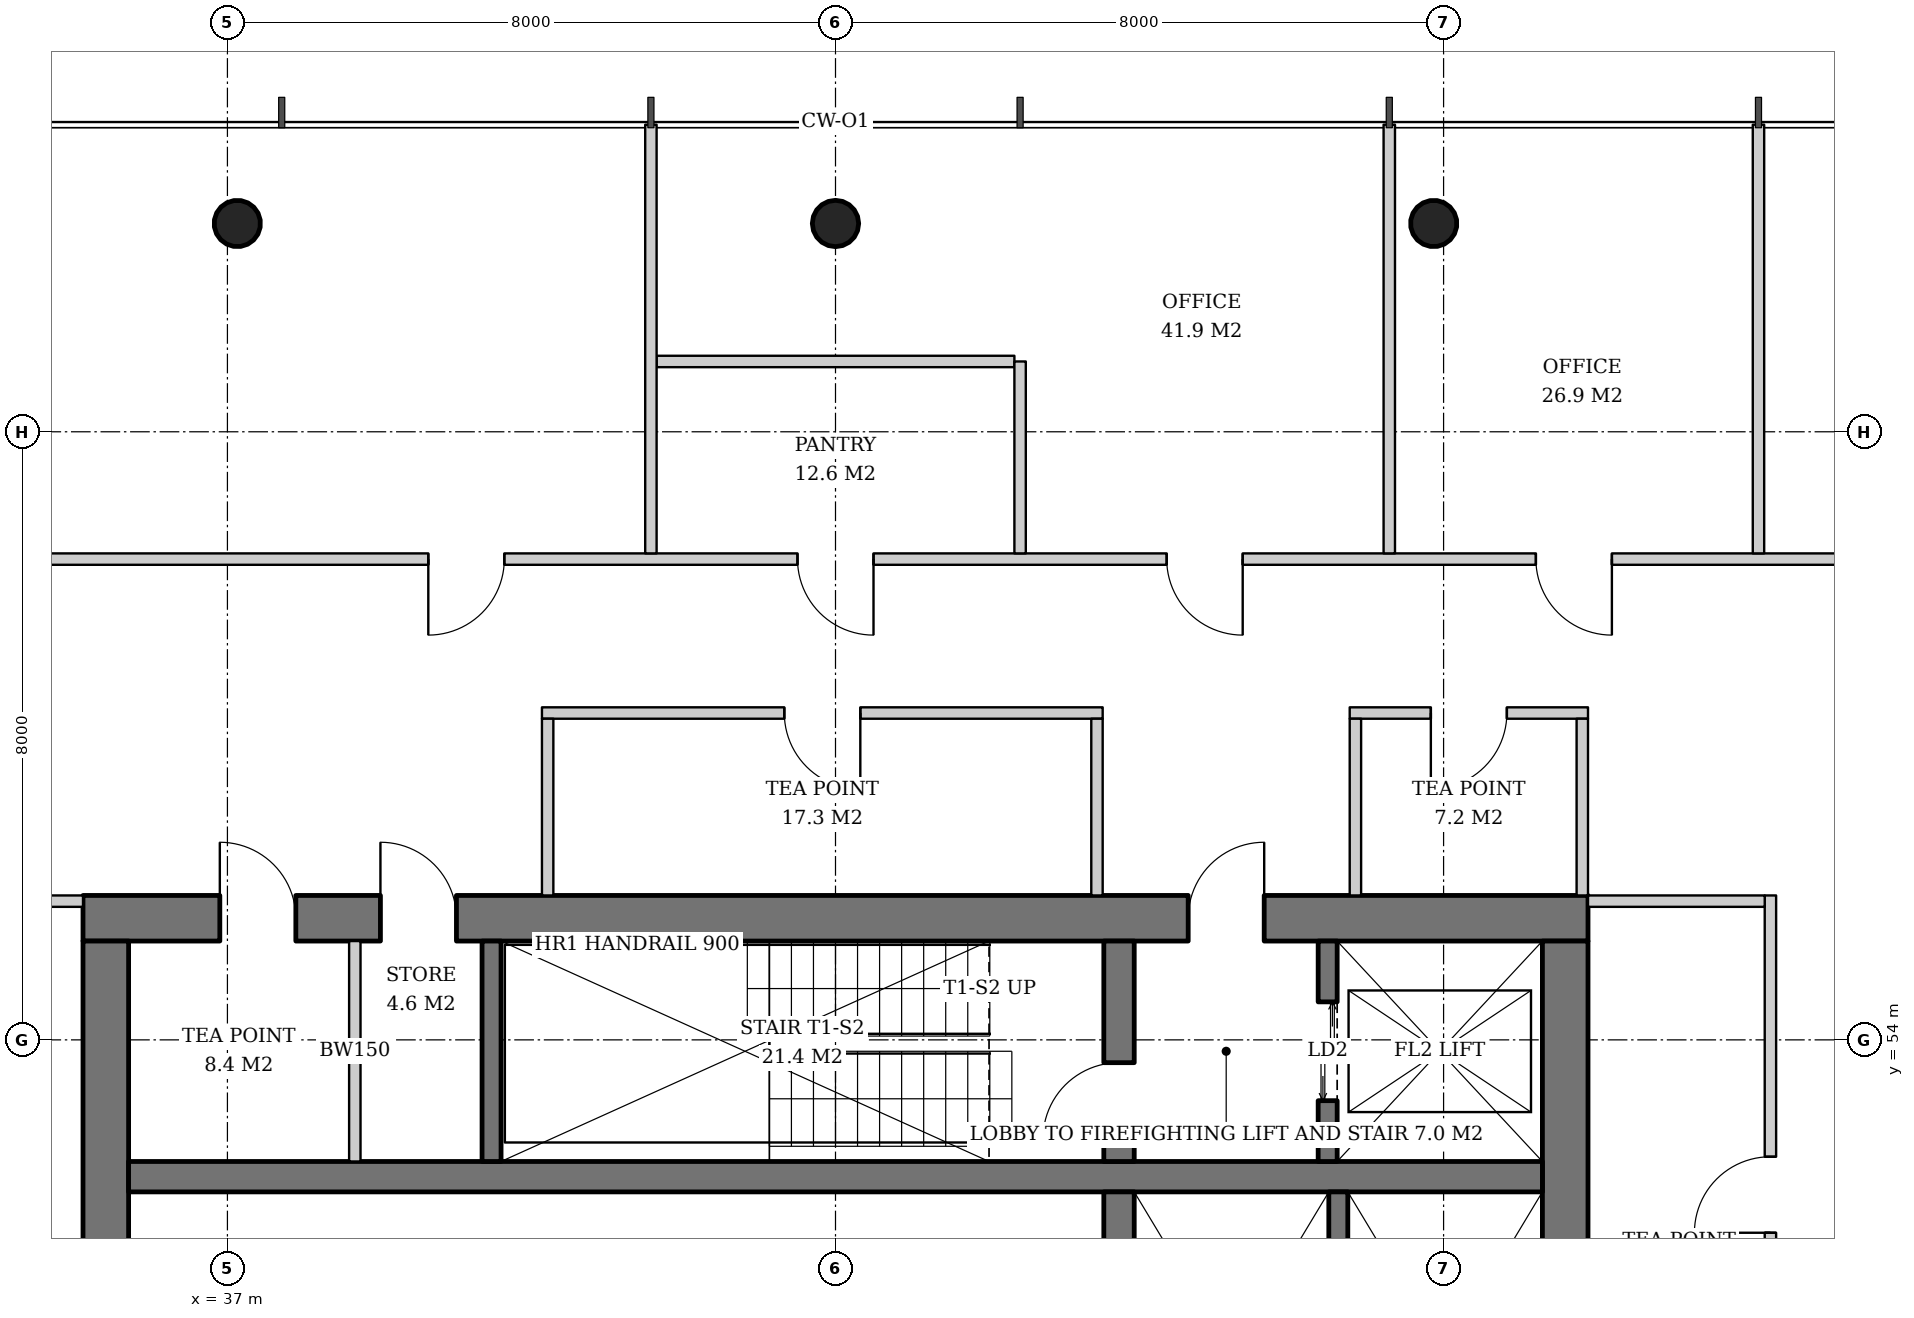
"""IFC4 building model, lengths in metres.
Left out: names, types, materials, properties, quantities, classifications, styles, units other than length and angle.
Written with IfcOpenShell. Run it as: python <this file> out.ifc"""

import sys

from ifc_helpers import new_model, si_unit, direction, frame, frame_2d, origin, origin_2d, place, context, subcontext, project, spatial, rectangle, hollow_circle, extrude, element, fill, save


model = new_model("IFC4")
c1 = context("Model", 3, precision=1e-05, world=origin(), true_north=direction((0.0, 1.0)))
c2 = subcontext(c1, "Body", "Model", "MODEL_VIEW")
j1 = project(units=[si_unit("LENGTHUNIT", "METRE"), si_unit("PLANEANGLEUNIT", "RADIAN")], contexts=[c1])
p1 = place(None, origin())
s1 = spatial("IfcSite", under=j1, at=p1, CompositionType="ELEMENT")
p2 = place(p1, origin())
s2 = spatial("IfcBuilding", under=s1, at=p2, CompositionType="ELEMENT")
p3 = place(p2, frame((0.0, 0.0, 184.4)))
s3 = spatial("IfcBuildingStorey", under=s2, at=p3, CompositionType="ELEMENT", Elevation=184.4)
p4 = place(p3, frame((52.889, 64.779, 0.0), z_axis=(-0.015987237665, -0.031910269556, 0.999362868496), x_axis=(0.894067115991, -0.447933021895, 0.0)))
e1 = element("IfcColumn", 1, at=p4, inside=s3, PredefinedType="COLUMN", context=c2, shape_type="SweptSolid", body=[
    extrude(hollow_circle(Radius=0.305, WallThickness=0.025, at=origin_2d()), origin(), (0.0, 0.0, 1.0), 3.802),
])
p5 = place(p3, frame((45.0, 64.779, 0.0), z_axis=(0.0, -0.031914348339, 0.999490607445), x_axis=(1.0, 0.0, 0.0)))
e2 = element("IfcColumn", 2, at=p5, inside=s3, PredefinedType="COLUMN", context=c2, shape_type="SweptSolid", body=[
    extrude(hollow_circle(Radius=0.305, WallThickness=0.025, at=origin_2d()), origin(), (0.0, 0.0, 1.0), 3.802),
])
p6 = place(p3, frame((37.111, 64.779, 0.0), z_axis=(0.015987237665, -0.031910269556, 0.999362868496), x_axis=(0.894067115991, 0.447933021895, 0.0)))
e3 = element("IfcColumn", 3, at=p6, inside=s3, PredefinedType="COLUMN", context=c2, shape_type="SweptSolid", body=[
    extrude(hollow_circle(Radius=0.305, WallThickness=0.025, at=origin_2d()), origin(), (0.0, 0.0, 1.0), 3.802),
])
p7 = place(p3, frame((35.1, 55.6, 0.0), z_axis=(0.0, 0.0, 1.0), x_axis=(1.0, 0.0, 0.0)))
e4 = element("IfcWall", 4, at=p7, inside=s3, PredefinedType="SHEAR", context=c2, shape_type="SweptSolid", body=[
    extrude(rectangle(XDim=19.8, YDim=0.6, at=frame_2d((9.9, 0.0))), origin(), (0.0, 0.0, 1.0), 3.8),
])
p8 = place(p7, frame((14.54, 0.0, 0.0)))
e5 = element("IfcOpeningElement", 5, at=p8, cuts=e4, PredefinedType="OPENING", context=c2, shape_type="SweptSolid", body=[
    extrude(rectangle(XDim=1.0, YDim=2.1, at=frame_2d((0.5, 1.05))), frame((0.0, 0.31, 0.0), z_axis=(0.0, -1.0, 0.0), x_axis=(1.0, 0.0, 0.0)), (0.0, 0.0, 1.0), 0.62),
])
p9 = place(p7, frame((1.8, 0.0, 0.0)))
e6 = element("IfcOpeningElement", 6, at=p9, cuts=e4, PredefinedType="OPENING", context=c2, shape_type="SweptSolid", body=[
    extrude(rectangle(XDim=1.0, YDim=2.1, at=frame_2d((0.5, 1.05))), frame((0.0, 0.31, 0.0), z_axis=(0.0, -1.0, 0.0), x_axis=(1.0, 0.0, 0.0)), (0.0, 0.0, 1.0), 0.62),
])
p10 = place(p7, frame((3.913, 0.0, 0.0)))
e7 = element("IfcOpeningElement", 7, at=p10, cuts=e4, PredefinedType="OPENING", context=c2, shape_type="SweptSolid", body=[
    extrude(rectangle(XDim=1.0, YDim=2.1, at=frame_2d((0.5, 1.05))), frame((0.0, 0.31, 0.0), z_axis=(0.0, -1.0, 0.0), x_axis=(1.0, 0.0, 0.0)), (0.0, 0.0, 1.0), 0.62),
])
p11 = place(p3, frame((35.4, 36.7, 0.0), z_axis=(0.0, 0.0, 1.0), x_axis=(0.0, 1.0, 0.0)))
e8 = element("IfcWall", 8, at=p11, inside=s3, PredefinedType="SHEAR", context=c2, shape_type="SweptSolid", body=[
    extrude(rectangle(XDim=18.6, YDim=0.6, at=frame_2d((9.3, 0.0))), origin(), (0.0, 0.0, 1.0), 3.8),
])
p12 = place(p11, frame((8.4, 0.0, 0.0)))
e9 = element("IfcOpeningElement", 9, at=p12, cuts=e8, PredefinedType="OPENING", context=c2, shape_type="SweptSolid", body=[
    extrude(rectangle(XDim=1.8, YDim=2.4, at=frame_2d((0.9, 1.2))), frame((0.0, 0.31, 0.0), z_axis=(0.0, -1.0, 0.0), x_axis=(1.0, 0.0, 0.0)), (0.0, 0.0, 1.0), 0.62),
])
p13 = place(p3, frame((54.6, 36.7, 0.0), z_axis=(0.0, 0.0, 1.0), x_axis=(0.0, 1.0, 0.0)))
e10 = element("IfcWall", 10, at=p13, inside=s3, PredefinedType="SHEAR", context=c2, shape_type="SweptSolid", body=[
    extrude(rectangle(XDim=18.6, YDim=0.6, at=frame_2d((9.3, 0.0))), origin(), (0.0, 0.0, 1.0), 3.8),
])
p14 = place(p13, frame((8.4, 0.0, 0.0)))
e11 = element("IfcOpeningElement", 11, at=p14, cuts=e10, PredefinedType="OPENING", context=c2, shape_type="SweptSolid", body=[
    extrude(rectangle(XDim=1.8, YDim=2.4, at=frame_2d((0.9, 1.2))), frame((0.0, 0.31, 0.0), z_axis=(0.0, -1.0, 0.0), x_axis=(1.0, 0.0, 0.0)), (0.0, 0.0, 1.0), 0.62),
])
p15 = place(p3, frame((35.7, 52.2, 0.0), z_axis=(0.0, 0.0, 1.0), x_axis=(1.0, 0.0, 0.0)))
e12 = element("IfcWall", 12, at=p15, inside=s3, PredefinedType="SHEAR", context=c2, shape_type="SweptSolid", body=[
    extrude(rectangle(XDim=18.6, YDim=0.4, at=frame_2d((9.3, 0.0))), origin(), (0.0, 0.0, 1.0), 3.8),
])
p16 = place(p3, frame((48.73, 40.0, 0.0), z_axis=(0.0, 0.0, 1.0), x_axis=(0.0, 1.0, 0.0)))
e13 = element("IfcWall", 13, at=p16, inside=s3, PredefinedType="SHEAR", context=c2, shape_type="SweptSolid", body=[
    extrude(rectangle(XDim=12.0, YDim=0.4, at=frame_2d((6.0, 0.0))), origin(), (0.0, 0.0, 1.0), 3.8),
])
p17 = place(p3, frame((48.73, 52.4, 0.0), z_axis=(0.0, 0.0, 1.0), x_axis=(0.0, 1.0, 0.0)))
e14 = element("IfcWall", 14, at=p17, inside=s3, PredefinedType="SHEAR", context=c2, shape_type="SweptSolid", body=[
    extrude(rectangle(XDim=2.9, YDim=0.4, at=frame_2d((1.45, 0.0))), origin(), (0.0, 0.0, 1.0), 3.8),
])
p18 = place(p17, frame((0.3, 0.0, 0.0)))
e15 = element("IfcOpeningElement", 15, at=p18, cuts=e14, PredefinedType="OPENING", context=c2, shape_type="SweptSolid", body=[
    extrude(rectangle(XDim=1.0, YDim=2.1, at=frame_2d((0.5, 1.05))), frame((0.0, 0.21, 0.0), z_axis=(0.0, -1.0, 0.0), x_axis=(1.0, 0.0, 0.0)), (0.0, 0.0, 1.0), 0.42),
])
p19 = place(p3, frame((40.475, 52.4, 0.0), z_axis=(0.0, 0.0, 1.0), x_axis=(0.0, 1.0, 0.0)))
e16 = element("IfcWall", 16, at=p19, inside=s3, PredefinedType="SHEAR", context=c2, shape_type="SweptSolid", body=[
    extrude(rectangle(XDim=2.9, YDim=0.25, at=frame_2d((1.45, 0.0))), origin(), (0.0, 0.0, 1.0), 3.8),
])
p20 = place(p3, frame((51.475, 52.4, 0.0), z_axis=(0.0, 0.0, 1.0), x_axis=(0.0, 1.0, 0.0)))
e17 = element("IfcWall", 17, at=p20, inside=s3, PredefinedType="SHEAR", context=c2, shape_type="SweptSolid", body=[
    extrude(rectangle(XDim=2.9, YDim=0.25, at=frame_2d((1.45, 0.0))), origin(), (0.0, 0.0, 1.0), 3.8),
])
p21 = place(p20, frame((0.8, 0.0, 0.0)))
e18 = element("IfcOpeningElement", 18, at=p21, cuts=e17, PredefinedType="OPENING", context=c2, shape_type="SweptSolid", body=[
    extrude(rectangle(XDim=1.3, YDim=2.2, at=frame_2d((0.65, 1.1))), frame((0.0, 0.135, 0.0), z_axis=(0.0, -1.0, 0.0), x_axis=(1.0, 0.0, 0.0)), (0.0, 0.0, 1.0), 0.27),
])
p22 = place(p3, frame((51.615, 47.75, 0.0), z_axis=(0.0, 0.0, 1.0), x_axis=(0.0, 1.0, 0.0)))
e19 = element("IfcWall", 19, at=p22, inside=s3, PredefinedType="SHEAR", context=c2, shape_type="SweptSolid", body=[
    extrude(rectangle(XDim=4.25, YDim=0.25, at=frame_2d((2.125, 0.0))), origin(), (0.0, 0.0, 1.0), 3.8),
])
p23 = place(p3, frame((38.676, 52.4, 0.0), z_axis=(0.0, 0.0, 1.0), x_axis=(0.0, 1.0, 0.0)))
e20 = element("IfcWall", 20, at=p23, inside=s3, PredefinedType="SOLIDWALL", context=c2, shape_type="SweptSolid", body=[
    extrude(rectangle(XDim=2.9, YDim=0.15, at=frame_2d((1.45, 0.0))), origin(), (0.0, 0.0, 1.0), 3.62),
])
p24 = place(p3, frame((57.3, 48.025, 0.0), z_axis=(0.0, 0.0, 1.0), x_axis=(0.0, 1.0, 0.0)))
e21 = element("IfcWall", 21, at=p24, inside=s3, PredefinedType="PARTITIONING", context=c2, shape_type="SweptSolid", body=[
    extrude(rectangle(XDim=7.875, YDim=0.15, at=frame_2d((3.938, 0.0))), origin(), (0.0, 0.0, 1.0), 2.867),
])
p25 = place(p24, frame((3.438, 0.0, 0.0)))
e22 = element("IfcOpeningElement", 22, at=p25, cuts=e21, PredefinedType="OPENING", context=c2, shape_type="SweptSolid", body=[
    extrude(rectangle(XDim=1.0, YDim=2.1, at=frame_2d((0.5, 1.05))), frame((0.0, 0.085, 0.0), z_axis=(0.0, -1.0, 0.0), x_axis=(1.0, 0.0, 0.0)), (0.0, 0.0, 1.0), 0.17),
])
p26 = place(p3, frame((54.9, 55.825, 0.0), z_axis=(0.0, 0.0, 1.0), x_axis=(1.0, 0.0, 0.0)))
e23 = element("IfcWall", 23, at=p26, inside=s3, PredefinedType="PARTITIONING", context=c2, shape_type="SweptSolid", body=[
    extrude(rectangle(XDim=2.325, YDim=0.15, at=frame_2d((1.163, 0.0))), origin(), (0.0, 0.0, 1.0), 3.62),
])
p27 = place(p3, frame((54.9, 58.3, 0.0), z_axis=(0.0, 0.0, 1.0), x_axis=(-1.0, 0.0, 0.0)))
e24 = element("IfcWall", 24, at=p27, inside=s3, PredefinedType="PARTITIONING", context=c2, shape_type="SweptSolid", body=[
    extrude(rectangle(XDim=3.135, YDim=0.15, at=frame_2d((1.567, 0.0))), origin(), (0.0, 0.0, 1.0), 2.92),
])
p28 = place(p27, frame((1.067, 0.0, 0.0)))
e25 = element("IfcOpeningElement", 25, at=p28, cuts=e24, PredefinedType="OPENING", context=c2, shape_type="SweptSolid", body=[
    extrude(rectangle(XDim=1.0, YDim=2.1, at=frame_2d((0.5, 1.05))), frame((0.0, 0.085, 0.0), z_axis=(0.0, -1.0, 0.0), x_axis=(1.0, 0.0, 0.0)), (0.0, 0.0, 1.0), 0.17),
])
p29 = place(p3, frame((54.825, 55.9, 0.0), z_axis=(0.0, 0.0, 1.0), x_axis=(0.0, 1.0, 0.0)))
e26 = element("IfcWall", 26, at=p29, inside=s3, PredefinedType="PARTITIONING", context=c2, shape_type="SweptSolid", body=[
    extrude(rectangle(XDim=2.325, YDim=0.15, at=frame_2d((1.163, 0.0))), origin(), (0.0, 0.0, 1.0), 2.867),
])
p30 = place(p3, frame((51.84, 55.9, 0.0), z_axis=(0.0, 0.0, 1.0), x_axis=(0.0, 1.0, 0.0)))
e27 = element("IfcWall", 27, at=p30, inside=s3, PredefinedType="PARTITIONING", context=c2, shape_type="SweptSolid", body=[
    extrude(rectangle(XDim=2.325, YDim=0.15, at=frame_2d((1.163, 0.0))), origin(), (0.0, 0.0, 1.0), 3.62),
])
p31 = place(p3, frame((48.515, 58.3, 0.0), z_axis=(0.0, 0.0, 1.0), x_axis=(-1.0, 0.0, 0.0)))
e28 = element("IfcWall", 28, at=p31, inside=s3, PredefinedType="PARTITIONING", context=c2, shape_type="SweptSolid", body=[
    extrude(rectangle(XDim=7.377, YDim=0.15, at=frame_2d((3.688, 0.0))), origin(), (0.0, 0.0, 1.0), 2.867),
])
p32 = place(p31, frame((3.188, 0.0, 0.0)))
e29 = element("IfcOpeningElement", 29, at=p32, cuts=e28, PredefinedType="OPENING", context=c2, shape_type="SweptSolid", body=[
    extrude(rectangle(XDim=1.0, YDim=2.1, at=frame_2d((0.5, 1.05))), frame((0.0, 0.085, 0.0), z_axis=(0.0, -1.0, 0.0), x_axis=(1.0, 0.0, 0.0)), (0.0, 0.0, 1.0), 0.17),
])
for number, where, z_axis, x_axis in (
    (30, (48.44, 55.9, 0.0), (0.0, 0.0, 1.0), (0.0, 1.0, 0.0)),
    (31, (41.213, 55.9, 0.0), (0.0, 0.0, 1.0), (0.0, 1.0, 0.0)),
):
    element("IfcWall", number, at=place(p3, frame(where, z_axis=z_axis, x_axis=x_axis)), inside=s3, PredefinedType="PARTITIONING", context=c2, shape_type="SweptSolid", body=[
        extrude(rectangle(XDim=2.325, YDim=0.15, at=frame_2d((1.163, 0.0))), origin(), (0.0, 0.0, 1.0), 3.62),
    ])
p33 = place(p3, frame((35.1, 55.825, 0.0), z_axis=(0.0, 0.0, 1.0), x_axis=(-1.0, 0.0, 0.0)))
e32 = element("IfcWall", 32, at=p33, inside=s3, PredefinedType="PARTITIONING", context=c2, shape_type="SweptSolid", body=[
    extrude(rectangle(XDim=2.325, YDim=0.15, at=frame_2d((1.163, 0.0))), origin(), (0.0, 0.0, 1.0), 2.867),
])
p34 = place(p3, frame((47.354, 62.925, 0.0), z_axis=(0.0, 0.0, 1.0), x_axis=(-1.0, 0.0, 0.0)))
e33 = element("IfcWall", 33, at=p34, inside=s3, PredefinedType="PARTITIONING", context=c2, shape_type="SweptSolid", body=[
    extrude(rectangle(XDim=4.707, YDim=0.15, at=frame_2d((2.354, 0.0))), origin(), (0.0, 0.0, 1.0), 2.867),
])
p35 = place(p3, frame((58.3, 60.325, 0.0), z_axis=(0.0, 0.0, 1.0), x_axis=(-1.0, 0.0, 0.0)))
e34 = element("IfcWall", 34, at=p35, inside=s3, PredefinedType="PARTITIONING", context=c2, shape_type="SweptSolid", body=[
    extrude(rectangle(XDim=26.6, YDim=0.15, at=frame_2d((13.3, 0.0))), origin(), (0.0, 0.0, 1.0), 2.867),
])
p36 = place(p35, frame((3.086, 0.0, 0.0)))
e35 = element("IfcOpeningElement", 35, at=p36, cuts=e34, PredefinedType="OPENING", context=c2, shape_type="SweptSolid", body=[
    extrude(rectangle(XDim=1.0, YDim=2.1, at=frame_2d((0.5, 1.05))), frame((0.0, 0.085, 0.0), z_axis=(0.0, -1.0, 0.0), x_axis=(1.0, 0.0, 0.0)), (0.0, 0.0, 1.0), 0.17),
])
p37 = place(p35, frame((7.943, 0.0, 0.0)))
e36 = element("IfcOpeningElement", 36, at=p37, cuts=e34, PredefinedType="OPENING", context=c2, shape_type="SweptSolid", body=[
    extrude(rectangle(XDim=1.0, YDim=2.1, at=frame_2d((0.5, 1.05))), frame((0.0, 0.085, 0.0), z_axis=(0.0, -1.0, 0.0), x_axis=(1.0, 0.0, 0.0)), (0.0, 0.0, 1.0), 0.17),
])
p38 = place(p35, frame((12.8, 0.0, 0.0)))
e37 = element("IfcOpeningElement", 37, at=p38, cuts=e34, PredefinedType="OPENING", context=c2, shape_type="SweptSolid", body=[
    extrude(rectangle(XDim=1.0, YDim=2.1, at=frame_2d((0.5, 1.05))), frame((0.0, 0.085, 0.0), z_axis=(0.0, -1.0, 0.0), x_axis=(1.0, 0.0, 0.0)), (0.0, 0.0, 1.0), 0.17),
])
p39 = place(p35, frame((17.657, 0.0, 0.0)))
e38 = element("IfcOpeningElement", 38, at=p39, cuts=e34, PredefinedType="OPENING", context=c2, shape_type="SweptSolid", body=[
    extrude(rectangle(XDim=1.0, YDim=2.1, at=frame_2d((0.5, 1.05))), frame((0.0, 0.085, 0.0), z_axis=(0.0, -1.0, 0.0), x_axis=(1.0, 0.0, 0.0)), (0.0, 0.0, 1.0), 0.17),
])
for number, where, z_axis, x_axis in (
    (39, (57.143, 60.4, 0.0), (0.0, 0.0, 1.0), (0.0, 1.0, 0.0)),
    (40, (52.286, 60.4, 0.0), (0.0, 0.0, 1.0), (0.0, 1.0, 0.0)),
):
    element("IfcWall", number, at=place(p3, frame(where, z_axis=z_axis, x_axis=x_axis)), inside=s3, PredefinedType="PARTITIONING", context=c2, shape_type="SweptSolid", body=[
        extrude(rectangle(XDim=5.64, YDim=0.15, at=frame_2d((2.82, 0.0))), origin(), (0.0, 0.0, 1.0), 3.12),
    ])
p40 = place(p3, frame((47.428, 60.4, 0.0), z_axis=(0.0, 0.0, 1.0), x_axis=(0.0, 1.0, 0.0)))
e41 = element("IfcWall", 41, at=p40, inside=s3, PredefinedType="PARTITIONING", context=c2, shape_type="SweptSolid", body=[
    extrude(rectangle(XDim=2.525, YDim=0.15, at=frame_2d((1.263, 0.0))), origin(), (0.0, 0.0, 1.0), 3.62),
])
p41 = place(p3, frame((42.572, 60.4, 0.0), z_axis=(0.0, 0.0, 1.0), x_axis=(0.0, 1.0, 0.0)))
e42 = element("IfcWall", 42, at=p41, inside=s3, PredefinedType="PARTITIONING", context=c2, shape_type="SweptSolid", body=[
    extrude(rectangle(XDim=5.64, YDim=0.15, at=frame_2d((2.82, 0.0))), origin(), (0.0, 0.0, 1.0), 2.867),
])
p42 = place(p21, origin())
e43 = element("IfcDoor", 43, at=p42, inside=s3, OperationType="DOUBLE_DOOR_SLIDING", PredefinedType="DOOR", context=c2, shape_type="SweptSolid", body=[
    extrude(rectangle(XDim=1.3, YDim=2.2, at=frame_2d((0.65, 1.1))), frame((0.0, 0.025, 0.0), z_axis=(0.0, -1.0, 0.0), x_axis=(1.0, 0.0, 0.0)), (0.0, 0.0, 1.0), 0.05),
])
fill(e18, e43)
p43 = place(p18, origin())
e44 = element("IfcDoor", 44, at=p43, inside=s3, OperationType="SINGLE_SWING_LEFT", PredefinedType="DOOR", context=c2, shape_type="SweptSolid", body=[
    extrude(rectangle(XDim=1.0, YDim=2.1, at=frame_2d((0.5, 1.05))), frame((0.0, 0.025, 0.0), z_axis=(0.0, -1.0, 0.0), x_axis=(1.0, 0.0, 0.0)), (0.0, 0.0, 1.0), 0.05),
])
fill(e15, e44)
p44 = place(p8, origin())
e45 = element("IfcDoor", 45, at=p44, inside=s3, OperationType="SINGLE_SWING_RIGHT", PredefinedType="DOOR", context=c2, shape_type="SweptSolid", body=[
    extrude(rectangle(XDim=1.0, YDim=2.1, at=frame_2d((0.5, 1.05))), frame((0.0, 0.025, 0.0), z_axis=(0.0, -1.0, 0.0), x_axis=(1.0, 0.0, 0.0)), (0.0, 0.0, 1.0), 0.05),
])
fill(e5, e45)
p45 = place(p9, origin())
e46 = element("IfcDoor", 46, at=p45, inside=s3, OperationType="SINGLE_SWING_LEFT", PredefinedType="DOOR", context=c2, shape_type="SweptSolid", body=[
    extrude(rectangle(XDim=1.0, YDim=2.1, at=frame_2d((0.5, 1.05))), frame((0.0, -0.24, 0.0), z_axis=(0.0, -1.0, 0.0), x_axis=(1.0, 0.0, 0.0)), (0.0, 0.0, 1.0), 0.05),
])
fill(e6, e46)
p46 = place(p10, origin())
e47 = element("IfcDoor", 47, at=p46, inside=s3, OperationType="SINGLE_SWING_LEFT", PredefinedType="DOOR", context=c2, shape_type="SweptSolid", body=[
    extrude(rectangle(XDim=1.0, YDim=2.1, at=frame_2d((0.5, 1.05))), frame((0.0, -0.24, 0.0), z_axis=(0.0, -1.0, 0.0), x_axis=(1.0, 0.0, 0.0)), (0.0, 0.0, 1.0), 0.05),
])
fill(e7, e47)
p47 = place(p25, origin())
e48 = element("IfcDoor", 48, at=p47, inside=s3, OperationType="SINGLE_SWING_LEFT", PredefinedType="DOOR", context=c2, shape_type="SweptSolid", body=[
    extrude(rectangle(XDim=1.0, YDim=2.1, at=frame_2d((0.5, 1.05))), frame((0.0, 0.025, 0.0), z_axis=(0.0, -1.0, 0.0), x_axis=(1.0, 0.0, 0.0)), (0.0, 0.0, 1.0), 0.05),
])
fill(e22, e48)
p48 = place(p28, origin())
e49 = element("IfcDoor", 49, at=p48, inside=s3, OperationType="SINGLE_SWING_RIGHT", PredefinedType="DOOR", context=c2, shape_type="SweptSolid", body=[
    extrude(rectangle(XDim=1.0, YDim=2.1, at=frame_2d((0.5, 1.05))), frame((0.0, 0.025, 0.0), z_axis=(0.0, -1.0, 0.0), x_axis=(1.0, 0.0, 0.0)), (0.0, 0.0, 1.0), 0.05),
])
fill(e25, e49)
p49 = place(p32, origin())
e50 = element("IfcDoor", 50, at=p49, inside=s3, OperationType="SINGLE_SWING_LEFT", PredefinedType="DOOR", context=c2, shape_type="SweptSolid", body=[
    extrude(rectangle(XDim=1.0, YDim=2.1, at=frame_2d((0.5, 1.05))), frame((0.0, 0.025, 0.0), z_axis=(0.0, -1.0, 0.0), x_axis=(1.0, 0.0, 0.0)), (0.0, 0.0, 1.0), 0.05),
])
fill(e29, e50)
p50 = place(p36, origin())
e51 = element("IfcDoor", 51, at=p50, inside=s3, OperationType="SINGLE_SWING_LEFT", PredefinedType="DOOR", context=c2, shape_type="SweptSolid", body=[
    extrude(rectangle(XDim=1.0, YDim=2.1, at=frame_2d((0.5, 1.05))), frame((0.0, 0.025, 0.0), z_axis=(0.0, -1.0, 0.0), x_axis=(1.0, 0.0, 0.0)), (0.0, 0.0, 1.0), 0.05),
])
fill(e35, e51)
p51 = place(p37, origin())
e52 = element("IfcDoor", 52, at=p51, inside=s3, OperationType="SINGLE_SWING_LEFT", PredefinedType="DOOR", context=c2, shape_type="SweptSolid", body=[
    extrude(rectangle(XDim=1.0, YDim=2.1, at=frame_2d((0.5, 1.05))), frame((0.0, 0.025, 0.0), z_axis=(0.0, -1.0, 0.0), x_axis=(1.0, 0.0, 0.0)), (0.0, 0.0, 1.0), 0.05),
])
fill(e36, e52)
p52 = place(p38, origin())
e53 = element("IfcDoor", 53, at=p52, inside=s3, OperationType="SINGLE_SWING_LEFT", PredefinedType="DOOR", context=c2, shape_type="SweptSolid", body=[
    extrude(rectangle(XDim=1.0, YDim=2.1, at=frame_2d((0.5, 1.05))), frame((0.0, 0.025, 0.0), z_axis=(0.0, -1.0, 0.0), x_axis=(1.0, 0.0, 0.0)), (0.0, 0.0, 1.0), 0.05),
])
fill(e37, e53)
p53 = place(p39, origin())
e54 = element("IfcDoor", 54, at=p53, inside=s3, OperationType="SINGLE_SWING_RIGHT", PredefinedType="DOOR", context=c2, shape_type="SweptSolid", body=[
    extrude(rectangle(XDim=1.0, YDim=2.1, at=frame_2d((0.5, 1.05))), frame((0.0, 0.025, 0.0), z_axis=(0.0, -1.0, 0.0), x_axis=(1.0, 0.0, 0.0)), (0.0, 0.0, 1.0), 0.05),
])
fill(e38, e54)
save(model, sys.argv[1])
